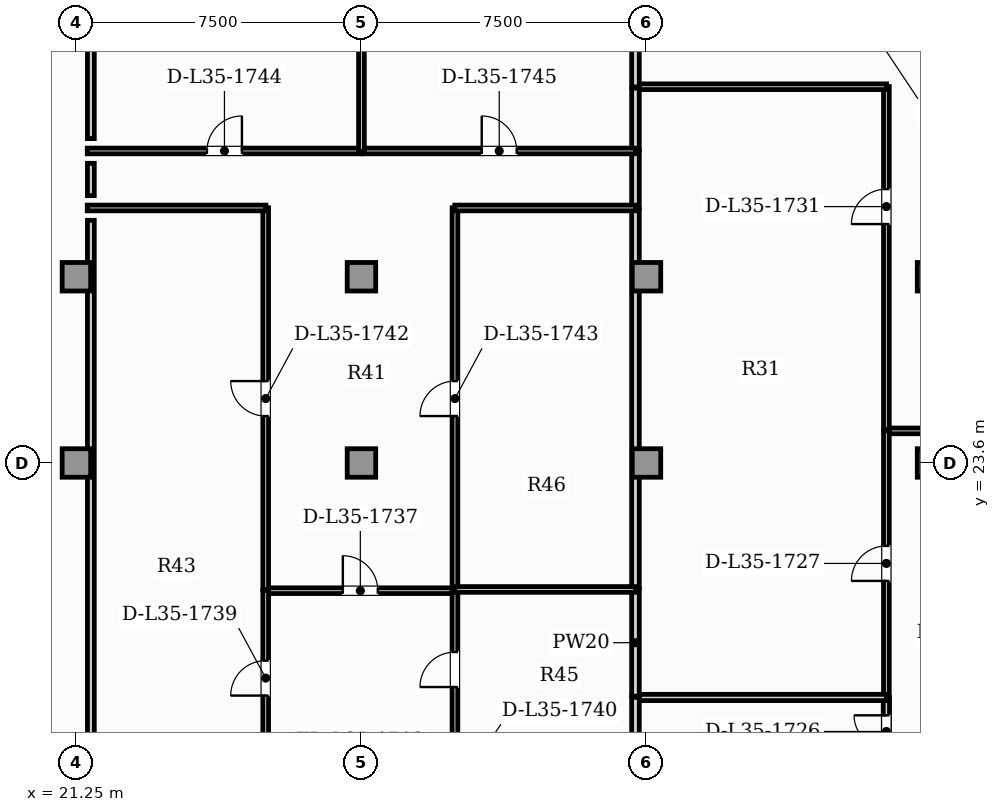
"""IFC4 building model, lengths in metres.
Left out: names, types, materials, properties, quantities, classifications, styles, units other than length and angle.
Written with IfcOpenShell. Run it as: python <this file> out.ifc"""

import sys

from ifc_helpers import new_model, si_unit, direction, frame, frame_2d, origin, origin_2d, place, context, subcontext, project, spatial, rectangle, extrude, element, fill, save


model = new_model("IFC4")
c1 = context("Model", 3, precision=1e-05, world=origin(), true_north=direction((0.0, 1.0)))
c2 = subcontext(c1, "Body", "Model", "MODEL_VIEW")
j1 = project(units=[si_unit("LENGTHUNIT", "METRE"), si_unit("PLANEANGLEUNIT", "RADIAN")], contexts=[c1])
p1 = place(None, origin())
s1 = spatial("IfcSite", under=j1, at=p1, CompositionType="ELEMENT")
p2 = place(p1, origin())
s2 = spatial("IfcBuilding", under=s1, at=p2, CompositionType="ELEMENT")
p3 = place(p2, frame((0.0, 0.0, 145.2)))
s3 = spatial("IfcBuildingStorey", under=s2, at=p3, CompositionType="ELEMENT", Elevation=145.2)
for number, where, z_axis, x_axis in (
    (1, (21.25, 23.6, 0.0), (0.0, 0.0, 1.0), (1.0, 0.0, 0.0)),
    (2, (28.75, 23.6, 0.0), (0.0, 0.0, 1.0), (1.0, 0.0, 0.0)),
    (3, (36.25, 23.6, 0.0), (0.0, 0.0, 1.0), (1.0, 0.0, 0.0)),
    (4, (43.75, 23.6, 0.0), (0.0, 0.0, 1.0), (1.0, 0.0, 0.0)),
    (5, (21.25, 28.5, 0.0), (0.0, 0.0, 1.0), (1.0, 0.0, 0.0)),
    (6, (28.75, 28.5, 0.0), (0.0, 0.0, 1.0), (1.0, 0.0, 0.0)),
    (7, (36.25, 28.5, 0.0), (0.0, 0.0, 1.0), (1.0, 0.0, 0.0)),
    (8, (43.75, 28.5, 0.0), (0.0, 0.0, 1.0), (1.0, 0.0, 0.0)),
):
    element("IfcColumn", number, at=place(p3, frame(where, z_axis=z_axis, x_axis=x_axis)), inside=s3, PredefinedType="COLUMN", context=c2, shape_type="SweptSolid", body=[
        extrude(rectangle(XDim=0.75, YDim=0.75, at=origin_2d()), origin(), (0.0, 0.0, 1.0), 3.85),
    ])
p4 = place(p3, frame((42.557, 24.444, 0.0), z_axis=(0.0, 0.0, 1.0), x_axis=(1.0, 0.0, 0.0)))
e9 = element("IfcWall", 9, at=p4, inside=s3, PredefinedType="PARTITIONING", context=c2, shape_type="SweptSolid", body=[
    extrude(rectangle(XDim=4.99, YDim=0.15, at=frame_2d((2.495, 0.0))), origin(), (0.0, 0.0, 1.0), 3.63),
])
p5 = place(p4, frame((2.035, 0.0, 0.0)))
e10 = element("IfcOpeningElement", 10, at=p5, cuts=e9, PredefinedType="OPENING", context=c2, shape_type="SweptSolid", body=[
    extrude(rectangle(XDim=0.92, YDim=2.1, at=frame_2d((0.46, 1.05))), frame((0.0, 0.085, 0.0), z_axis=(0.0, -1.0, 0.0), x_axis=(1.0, 0.0, 0.0)), (0.0, 0.0, 1.0), 0.17),
])
p6 = place(p3, frame((42.562, 15.635, 0.0), z_axis=(0.0, 0.0, 1.0), x_axis=(0.0, 1.0, 0.0)))
e11 = element("IfcWall", 11, at=p6, inside=s3, PredefinedType="PLUMBINGWALL", context=c2, shape_type="SweptSolid", body=[
    extrude(rectangle(XDim=1.8, YDim=0.165, at=frame_2d((0.9, 0.0))), origin(), (0.0, 0.0, 1.0), 3.63),
])
p7 = place(p6, frame((0.475, 0.0, 0.0)))
e12 = element("IfcOpeningElement", 12, at=p7, cuts=e11, PredefinedType="OPENING", context=c2, shape_type="SweptSolid", body=[
    extrude(rectangle(XDim=0.85, YDim=2.1, at=frame_2d((0.425, 1.05))), frame((0.0, 0.093, 0.0), z_axis=(0.0, -1.0, 0.0), x_axis=(1.0, 0.0, 0.0)), (0.0, 0.0, 1.0), 0.185),
])
p8 = place(p3, frame((42.562, 17.465, 0.0), z_axis=(0.0, 0.0, 1.0), x_axis=(0.0, 1.0, 0.0)))
e13 = element("IfcWall", 13, at=p8, inside=s3, PredefinedType="PARTITIONING", context=c2, shape_type="SweptSolid", body=[
    extrude(rectangle(XDim=6.984, YDim=0.15, at=frame_2d((3.492, 0.0))), origin(), (0.0, 0.0, 1.0), 3.63),
])
p9 = place(p8, frame((3.032, 0.0, 0.0)))
e14 = element("IfcOpeningElement", 14, at=p9, cuts=e13, PredefinedType="OPENING", context=c2, shape_type="SweptSolid", body=[
    extrude(rectangle(XDim=0.92, YDim=2.1, at=frame_2d((0.46, 1.05))), frame((0.0, 0.085, 0.0), z_axis=(0.0, -1.0, 0.0), x_axis=(1.0, 0.0, 0.0)), (0.0, 0.0, 1.0), 0.17),
])
p10 = place(p3, frame((42.562, 24.479, 0.0), z_axis=(0.0, 0.0, 1.0), x_axis=(0.0, 1.0, 0.0)))
e15 = element("IfcWall", 15, at=p10, inside=s3, PredefinedType="PARTITIONING", context=c2, shape_type="SweptSolid", body=[
    extrude(rectangle(XDim=9.026, YDim=0.15, at=frame_2d((4.513, 0.0))), origin(), (0.0, 0.0, 1.0), 3.63),
])
p11 = place(p10, frame((5.407, 0.0, 0.0)))
e16 = element("IfcOpeningElement", 16, at=p11, cuts=e15, PredefinedType="OPENING", context=c2, shape_type="SweptSolid", body=[
    extrude(rectangle(XDim=0.92, YDim=2.1, at=frame_2d((0.46, 1.05))), frame((0.0, 0.085, 0.0), z_axis=(0.0, -1.0, 0.0), x_axis=(1.0, 0.0, 0.0)), (0.0, 0.0, 1.0), 0.17),
])
p12 = place(p3, frame((35.955, 33.5, 0.0), z_axis=(0.0, 0.0, 1.0), x_axis=(1.0, 0.0, 0.0)))
e17 = element("IfcWall", 17, at=p12, inside=s3, PredefinedType="PARTITIONING", context=c2, shape_type="SweptSolid", body=[
    extrude(rectangle(XDim=6.612, YDim=0.15, at=frame_2d((3.306, 0.0))), origin(), (0.0, 0.0, 1.0), 3.63),
])
p13 = place(p3, frame((35.96, 33.495, 0.0), z_axis=(0.0, 0.0, 1.0), x_axis=(0.0, 1.0, 0.0)))
e18 = element("IfcWall", 18, at=p13, inside=s3, PredefinedType="PARTITIONING", context=c2, shape_type="SweptSolid", body=[
    extrude(rectangle(XDim=1.51, YDim=0.2, at=frame_2d((0.755, 0.0))), origin(), (0.0, 0.0, 1.0), 3.63),
])
p14 = place(p3, frame((35.955, 17.43, 0.0), z_axis=(0.0, 0.0, 1.0), x_axis=(1.0, 0.0, 0.0)))
e19 = element("IfcWall", 19, at=p14, inside=s3, PredefinedType="PLUMBINGWALL", context=c2, shape_type="SweptSolid", body=[
    extrude(rectangle(XDim=6.612, YDim=0.165, at=frame_2d((3.306, 0.0))), origin(), (0.0, 0.0, 1.0), 3.63),
])
p15 = place(p3, frame((35.96, 16.046, 0.0), z_axis=(0.0, 0.0, 1.0), x_axis=(0.0, 1.0, 0.0)))
e20 = element("IfcWall", 20, at=p15, inside=s3, PredefinedType="PARTITIONING", context=c2, shape_type="SweptSolid", body=[
    extrude(rectangle(XDim=1.389, YDim=0.2, at=frame_2d((0.695, 0.0))), origin(), (0.0, 0.0, 1.0), 3.63),
])
p16 = place(p3, frame((35.96, 30.305, 0.0), z_axis=(0.0, 0.0, 1.0), x_axis=(0.0, 1.0, 0.0)))
e21 = element("IfcWall", 21, at=p16, inside=s3, PredefinedType="PARTITIONING", context=c2, shape_type="SweptSolid", body=[
    extrude(rectangle(XDim=1.51, YDim=0.2, at=frame_2d((0.755, 0.0))), origin(), (0.0, 0.0, 1.0), 3.63),
])
p17 = place(p3, frame((35.96, 17.465, 0.0), z_axis=(0.0, 0.0, 1.0), x_axis=(0.0, 1.0, 0.0)))
e22 = element("IfcWall", 22, at=p17, inside=s3, PredefinedType="PARTITIONING", context=c2, shape_type="SweptSolid", body=[
    extrude(rectangle(XDim=2.812, YDim=0.2, at=frame_2d((1.406, 0.0))), origin(), (0.0, 0.0, 1.0), 3.63),
])
p18 = place(p3, frame((35.96, 20.308, 0.0), z_axis=(0.0, 0.0, 1.0), x_axis=(0.0, 1.0, 0.0)))
e23 = element("IfcWall", 23, at=p18, inside=s3, PredefinedType="PARTITIONING", context=c2, shape_type="SweptSolid", body=[
    extrude(rectangle(XDim=9.967, YDim=0.2, at=frame_2d((4.984, 0.0))), origin(), (0.0, 0.0, 1.0), 3.63),
])
p19 = place(p3, frame((35.96, 31.845, 0.0), z_axis=(0.0, 0.0, 1.0), x_axis=(0.0, 1.0, 0.0)))
e24 = element("IfcWall", 24, at=p19, inside=s3, PredefinedType="PARTITIONING", context=c2, shape_type="SweptSolid", body=[
    extrude(rectangle(XDim=1.62, YDim=0.2, at=frame_2d((0.81, 0.0))), origin(), (0.0, 0.0, 1.0), 3.63),
])
p20 = place(p3, frame((26.225, 20.239, 0.0), z_axis=(0.0, 0.0, 1.0), x_axis=(1.0, 0.0, 0.0)))
e25 = element("IfcWall", 25, at=p20, inside=s3, PredefinedType="PARTITIONING", context=c2, shape_type="SweptSolid", body=[
    extrude(rectangle(XDim=4.99, YDim=0.15, at=frame_2d((2.495, 0.0))), origin(), (0.0, 0.0, 1.0), 3.63),
])
p21 = place(p20, frame((2.035, 0.0, 0.0)))
e26 = element("IfcOpeningElement", 26, at=p21, cuts=e25, PredefinedType="OPENING", context=c2, shape_type="SweptSolid", body=[
    extrude(rectangle(XDim=0.92, YDim=2.1, at=frame_2d((0.46, 1.05))), frame((0.0, 0.085, 0.0), z_axis=(0.0, -1.0, 0.0), x_axis=(1.0, 0.0, 0.0)), (0.0, 0.0, 1.0), 0.17),
])
p22 = place(p3, frame((26.23, 15.635, 0.0), z_axis=(0.0, 0.0, 1.0), x_axis=(0.0, 1.0, 0.0)))
e27 = element("IfcWall", 27, at=p22, inside=s3, PredefinedType="PARTITIONING", context=c2, shape_type="SweptSolid", body=[
    extrude(rectangle(XDim=4.609, YDim=0.15, at=frame_2d((2.305, 0.0))), origin(), (0.0, 0.0, 1.0), 3.63),
])
p23 = place(p22, frame((1.844, 0.0, 0.0)))
e28 = element("IfcOpeningElement", 28, at=p23, cuts=e27, PredefinedType="OPENING", context=c2, shape_type="SweptSolid", body=[
    extrude(rectangle(XDim=0.92, YDim=2.1, at=frame_2d((0.46, 1.05))), frame((0.0, 0.085, 0.0), z_axis=(0.0, -1.0, 0.0), x_axis=(1.0, 0.0, 0.0)), (0.0, 0.0, 1.0), 0.17),
])
p24 = place(p3, frame((31.21, 16.086, 0.0), z_axis=(0.0, 0.0, 1.0), x_axis=(0.0, 1.0, 0.0)))
e29 = element("IfcWall", 29, at=p24, inside=s3, PredefinedType="PARTITIONING", context=c2, shape_type="SweptSolid", body=[
    extrude(rectangle(XDim=4.159, YDim=0.15, at=frame_2d((2.079, 0.0))), origin(), (0.0, 0.0, 1.0), 3.63),
])
p25 = place(p24, frame((1.619, 0.0, 0.0)))
e30 = element("IfcOpeningElement", 30, at=p25, cuts=e29, PredefinedType="OPENING", context=c2, shape_type="SweptSolid", body=[
    extrude(rectangle(XDim=0.92, YDim=2.1, at=frame_2d((0.46, 1.05))), frame((0.0, 0.085, 0.0), z_axis=(0.0, -1.0, 0.0), x_axis=(1.0, 0.0, 0.0)), (0.0, 0.0, 1.0), 0.17),
])
p26 = place(p3, frame((26.23, 20.274, 0.0), z_axis=(0.0, 0.0, 1.0), x_axis=(0.0, 1.0, 0.0)))
e31 = element("IfcWall", 31, at=p26, inside=s3, PredefinedType="PARTITIONING", context=c2, shape_type="SweptSolid", body=[
    extrude(rectangle(XDim=10.041, YDim=0.15, at=frame_2d((5.02, 0.0))), origin(), (0.0, 0.0, 1.0), 3.63),
])
p27 = place(p26, frame((4.56, 0.0, 0.0)))
e32 = element("IfcOpeningElement", 32, at=p27, cuts=e31, PredefinedType="OPENING", context=c2, shape_type="SweptSolid", body=[
    extrude(rectangle(XDim=0.92, YDim=2.1, at=frame_2d((0.46, 1.05))), frame((0.0, 0.085, 0.0), z_axis=(0.0, -1.0, 0.0), x_axis=(1.0, 0.0, 0.0)), (0.0, 0.0, 1.0), 0.17),
])
p28 = place(p3, frame((21.535, 30.31, 0.0), z_axis=(0.0, 0.0, 1.0), x_axis=(1.0, 0.0, 0.0)))
e33 = element("IfcWall", 33, at=p28, inside=s3, PredefinedType="PARTITIONING", context=c2, shape_type="SweptSolid", body=[
    extrude(rectangle(XDim=4.7, YDim=0.15, at=frame_2d((2.35, 0.0))), origin(), (0.0, 0.0, 1.0), 3.63),
])
p29 = place(p3, frame((31.21, 20.274, 0.0), z_axis=(0.0, 0.0, 1.0), x_axis=(0.0, 1.0, 0.0)))
e34 = element("IfcWall", 34, at=p29, inside=s3, PredefinedType="PARTITIONING", context=c2, shape_type="SweptSolid", body=[
    extrude(rectangle(XDim=10.041, YDim=0.15, at=frame_2d((5.02, 0.0))), origin(), (0.0, 0.0, 1.0), 3.63),
])
p30 = place(p29, frame((4.56, 0.0, 0.0)))
e35 = element("IfcOpeningElement", 35, at=p30, cuts=e34, PredefinedType="OPENING", context=c2, shape_type="SweptSolid", body=[
    extrude(rectangle(XDim=0.92, YDim=2.1, at=frame_2d((0.46, 1.05))), frame((0.0, 0.085, 0.0), z_axis=(0.0, -1.0, 0.0), x_axis=(1.0, 0.0, 0.0)), (0.0, 0.0, 1.0), 0.17),
])
p31 = place(p3, frame((31.205, 30.31, 0.0), z_axis=(0.0, 0.0, 1.0), x_axis=(1.0, 0.0, 0.0)))
e36 = element("IfcWall", 36, at=p31, inside=s3, PredefinedType="PARTITIONING", context=c2, shape_type="SweptSolid", body=[
    extrude(rectangle(XDim=4.76, YDim=0.15, at=frame_2d((2.38, 0.0))), origin(), (0.0, 0.0, 1.0), 3.63),
])
p32 = place(p3, frame((21.535, 31.81, 0.0), z_axis=(0.0, 0.0, 1.0), x_axis=(1.0, 0.0, 0.0)))
e37 = element("IfcWall", 37, at=p32, inside=s3, PredefinedType="PARTITIONING", context=c2, shape_type="SweptSolid", body=[
    extrude(rectangle(XDim=7.22, YDim=0.15, at=frame_2d((3.61, 0.0))), origin(), (0.0, 0.0, 1.0), 3.63),
])
p33 = place(p32, frame((3.15, 0.0, 0.0)))
e38 = element("IfcOpeningElement", 38, at=p33, cuts=e37, PredefinedType="OPENING", context=c2, shape_type="SweptSolid", body=[
    extrude(rectangle(XDim=0.92, YDim=2.1, at=frame_2d((0.46, 1.05))), frame((0.0, 0.085, 0.0), z_axis=(0.0, -1.0, 0.0), x_axis=(1.0, 0.0, 0.0)), (0.0, 0.0, 1.0), 0.17),
])
p34 = place(p3, frame((28.785, 31.81, 0.0), z_axis=(0.0, 0.0, 1.0), x_axis=(1.0, 0.0, 0.0)))
e39 = element("IfcWall", 39, at=p34, inside=s3, PredefinedType="PARTITIONING", context=c2, shape_type="SweptSolid", body=[
    extrude(rectangle(XDim=7.18, YDim=0.15, at=frame_2d((3.59, 0.0))), origin(), (0.0, 0.0, 1.0), 3.63),
])
p35 = place(p34, frame((3.13, 0.0, 0.0)))
e40 = element("IfcOpeningElement", 40, at=p35, cuts=e39, PredefinedType="OPENING", context=c2, shape_type="SweptSolid", body=[
    extrude(rectangle(XDim=0.92, YDim=2.1, at=frame_2d((0.46, 1.05))), frame((0.0, 0.085, 0.0), z_axis=(0.0, -1.0, 0.0), x_axis=(1.0, 0.0, 0.0)), (0.0, 0.0, 1.0), 0.17),
])
p36 = place(p3, frame((31.205, 20.272, 0.0), z_axis=(0.0, 0.0, 1.0), x_axis=(1.0, 0.0, 0.0)))
e41 = element("IfcWall", 41, at=p36, inside=s3, PredefinedType="PARTITIONING", context=c2, shape_type="SweptSolid", body=[
    extrude(rectangle(XDim=4.76, YDim=0.15, at=frame_2d((2.38, 0.0))), origin(), (0.0, 0.0, 1.0), 3.63),
])
p37 = place(p3, frame((28.75, 31.805, 0.0), z_axis=(0.0, 0.0, 1.0), x_axis=(0.0, 1.0, 0.0)))
e42 = element("IfcWall", 42, at=p37, inside=s3, PredefinedType="PARTITIONING", context=c2, shape_type="SweptSolid", body=[
    extrude(rectangle(XDim=5.021, YDim=0.15, at=frame_2d((2.51, 0.0))), origin(), (0.0, 0.0, 1.0), 3.177),
])
p38 = place(p3, frame((21.63, 30.635, 0.0), z_axis=(0.0, 0.0, 1.0), x_axis=(0.0, 1.0, 0.0)))
e43 = element("IfcWall", 43, at=p38, inside=s3, PredefinedType="PARTITIONING", context=c2, shape_type="SweptSolid", body=[
    extrude(rectangle(XDim=0.85, YDim=0.18, at=frame_2d((0.425, 0.0))), origin(), (0.0, 0.0, 1.0), 3.63),
])
p39 = place(p3, frame((21.63, 15.925, 0.0), z_axis=(0.0, 0.0, 1.0), x_axis=(0.0, 1.0, 0.0)))
e44 = element("IfcWall", 44, at=p39, inside=s3, PredefinedType="PARTITIONING", context=c2, shape_type="SweptSolid", body=[
    extrude(rectangle(XDim=14.06, YDim=0.18, at=frame_2d((7.03, 0.0))), origin(), (0.0, 0.0, 1.0), 3.63),
])
p40 = place(p3, frame((21.63, 32.135, 0.0), z_axis=(0.0, 0.0, 1.0), x_axis=(0.0, 1.0, 0.0)))
e45 = element("IfcWall", 45, at=p40, inside=s3, PredefinedType="PARTITIONING", context=c2, shape_type="SweptSolid", body=[
    extrude(rectangle(XDim=4.692, YDim=0.18, at=frame_2d((2.346, 0.0))), origin(), (0.0, 0.0, 1.0), 3.63),
])
p41 = place(p7, origin())
e46 = element("IfcDoor", 46, at=p41, inside=s3, OperationType="SINGLE_SWING_RIGHT", PredefinedType="DOOR", context=c2, shape_type="SweptSolid", body=[
    extrude(rectangle(XDim=0.85, YDim=2.1, at=frame_2d((0.425, 1.05))), frame((0.0, 0.025, 0.0), z_axis=(0.0, -1.0, 0.0), x_axis=(1.0, 0.0, 0.0)), (0.0, 0.0, 1.0), 0.05),
])
fill(e12, e46)
p42 = place(p9, origin())
e47 = element("IfcDoor", 47, at=p42, inside=s3, OperationType="SINGLE_SWING_LEFT", PredefinedType="DOOR", context=c2, shape_type="SweptSolid", body=[
    extrude(rectangle(XDim=0.92, YDim=2.1, at=frame_2d((0.46, 1.05))), frame((0.0, 0.025, 0.0), z_axis=(0.0, -1.0, 0.0), x_axis=(1.0, 0.0, 0.0)), (0.0, 0.0, 1.0), 0.05),
])
fill(e14, e47)
p43 = place(p11, origin())
e48 = element("IfcDoor", 48, at=p43, inside=s3, OperationType="SINGLE_SWING_LEFT", PredefinedType="DOOR", context=c2, shape_type="SweptSolid", body=[
    extrude(rectangle(XDim=0.92, YDim=2.1, at=frame_2d((0.46, 1.05))), frame((0.0, 0.025, 0.0), z_axis=(0.0, -1.0, 0.0), x_axis=(1.0, 0.0, 0.0)), (0.0, 0.0, 1.0), 0.05),
])
fill(e16, e48)
p44 = place(p21, origin())
e49 = element("IfcDoor", 49, at=p44, inside=s3, OperationType="SINGLE_SWING_LEFT", PredefinedType="DOOR", context=c2, shape_type="SweptSolid", body=[
    extrude(rectangle(XDim=0.92, YDim=2.1, at=frame_2d((0.46, 1.05))), frame((0.0, 0.025, 0.0), z_axis=(0.0, -1.0, 0.0), x_axis=(1.0, 0.0, 0.0)), (0.0, 0.0, 1.0), 0.05),
])
fill(e26, e49)
p45 = place(p23, origin())
e50 = element("IfcDoor", 50, at=p45, inside=s3, OperationType="SINGLE_SWING_LEFT", PredefinedType="DOOR", context=c2, shape_type="SweptSolid", body=[
    extrude(rectangle(XDim=0.92, YDim=2.1, at=frame_2d((0.46, 1.05))), frame((0.0, 0.025, 0.0), z_axis=(0.0, -1.0, 0.0), x_axis=(1.0, 0.0, 0.0)), (0.0, 0.0, 1.0), 0.05),
])
fill(e28, e50)
p46 = place(p25, origin())
e51 = element("IfcDoor", 51, at=p46, inside=s3, OperationType="SINGLE_SWING_LEFT", PredefinedType="DOOR", context=c2, shape_type="SweptSolid", body=[
    extrude(rectangle(XDim=0.92, YDim=2.1, at=frame_2d((0.46, 1.05))), frame((0.0, 0.025, 0.0), z_axis=(0.0, -1.0, 0.0), x_axis=(1.0, 0.0, 0.0)), (0.0, 0.0, 1.0), 0.05),
])
fill(e30, e51)
p47 = place(p27, origin())
e52 = element("IfcDoor", 52, at=p47, inside=s3, OperationType="SINGLE_SWING_RIGHT", PredefinedType="DOOR", context=c2, shape_type="SweptSolid", body=[
    extrude(rectangle(XDim=0.92, YDim=2.1, at=frame_2d((0.46, 1.05))), frame((0.0, 0.025, 0.0), z_axis=(0.0, -1.0, 0.0), x_axis=(1.0, 0.0, 0.0)), (0.0, 0.0, 1.0), 0.05),
])
fill(e32, e52)
p48 = place(p30, origin())
e53 = element("IfcDoor", 53, at=p48, inside=s3, OperationType="SINGLE_SWING_LEFT", PredefinedType="DOOR", context=c2, shape_type="SweptSolid", body=[
    extrude(rectangle(XDim=0.92, YDim=2.1, at=frame_2d((0.46, 1.05))), frame((0.0, 0.025, 0.0), z_axis=(0.0, -1.0, 0.0), x_axis=(1.0, 0.0, 0.0)), (0.0, 0.0, 1.0), 0.05),
])
fill(e35, e53)
p49 = place(p33, origin())
e54 = element("IfcDoor", 54, at=p49, inside=s3, OperationType="SINGLE_SWING_RIGHT", PredefinedType="DOOR", context=c2, shape_type="SweptSolid", body=[
    extrude(rectangle(XDim=0.92, YDim=2.1, at=frame_2d((0.46, 1.05))), frame((0.0, 0.025, 0.0), z_axis=(0.0, -1.0, 0.0), x_axis=(1.0, 0.0, 0.0)), (0.0, 0.0, 1.0), 0.05),
])
fill(e38, e54)
p50 = place(p35, origin())
e55 = element("IfcDoor", 55, at=p50, inside=s3, OperationType="SINGLE_SWING_LEFT", PredefinedType="DOOR", context=c2, shape_type="SweptSolid", body=[
    extrude(rectangle(XDim=0.92, YDim=2.1, at=frame_2d((0.46, 1.05))), frame((0.0, 0.025, 0.0), z_axis=(0.0, -1.0, 0.0), x_axis=(1.0, 0.0, 0.0)), (0.0, 0.0, 1.0), 0.05),
])
fill(e40, e55)
save(model, sys.argv[1])
